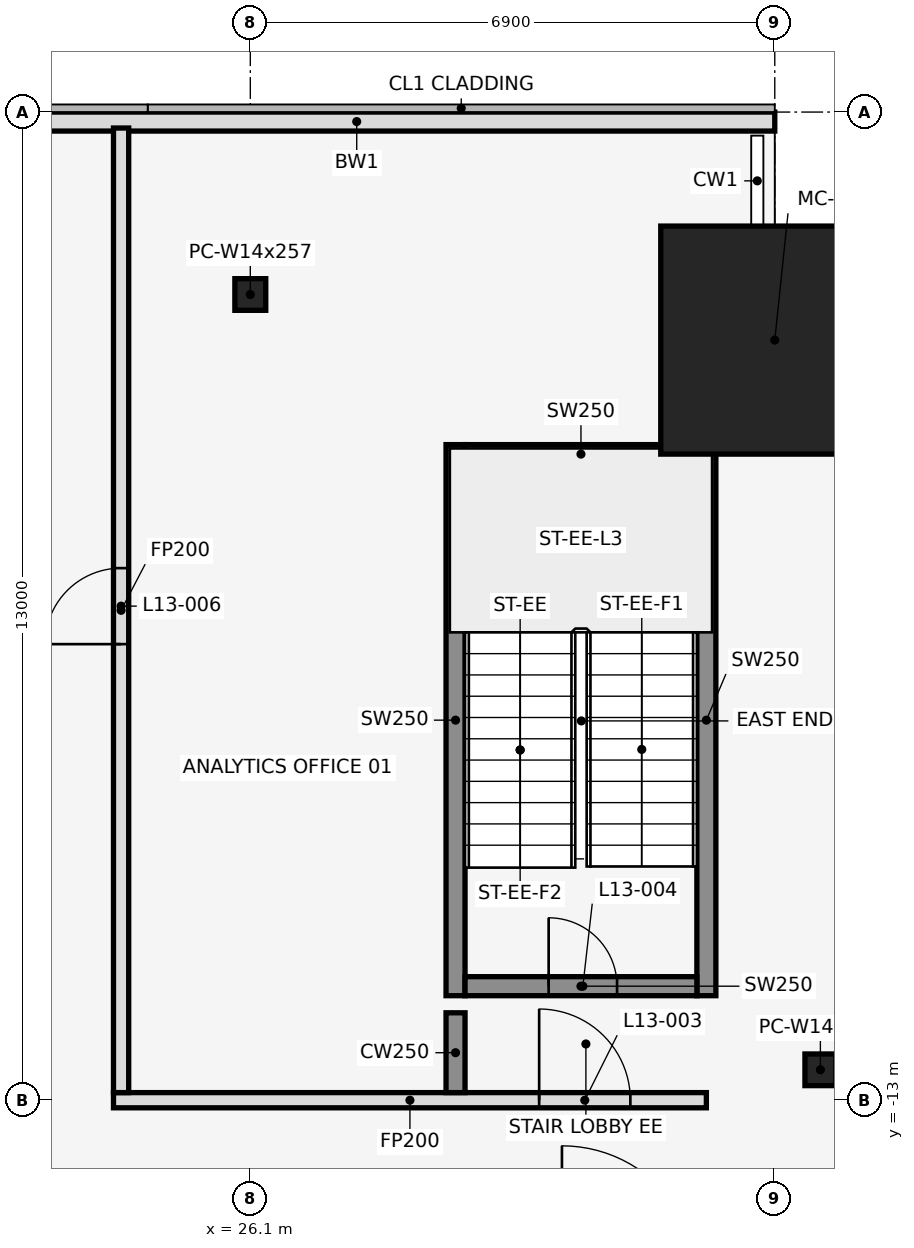
"""IFC4 building model, lengths in metres.
Left out: names, types, materials, properties, quantities, classifications, styles, units other than length and angle.
Written with IfcOpenShell. Run it as: python <this file> out.ifc"""

import sys

from ifc_helpers import new_model, si_unit, direction, frame, frame_2d, origin, origin_2d, place, context, subcontext, project, spatial, rectangle, hollow_rectangle, i_section, extrude, element, fill, save


model = new_model("IFC4")
c1 = context("Model", 3, precision=1e-05, world=origin(), true_north=direction((0.0, 1.0)))
c2 = subcontext(c1, "Body", "Model", "MODEL_VIEW")
j1 = project(units=[si_unit("LENGTHUNIT", "METRE"), si_unit("PLANEANGLEUNIT", "RADIAN")], contexts=[c1])
p1 = place(None, origin())
s1 = spatial("IfcSite", under=j1, at=p1, CompositionType="ELEMENT")
p2 = place(p1, origin())
s2 = spatial("IfcBuilding", under=s1, at=p2, CompositionType="ELEMENT")
p3 = place(p2, frame((0.0, 0.0, 66.5)))
s3 = spatial("IfcBuildingStorey", under=s2, at=p3, CompositionType="ELEMENT", Elevation=66.5)
p4 = place(p3, frame((26.1, -2.4, 0.0), z_axis=(0.0, 0.0, 1.0), x_axis=(1.0, 0.0, 0.0)))
e1 = element("IfcColumn", 1, at=p4, inside=s3, PredefinedType="COLUMN", context=c2, shape_type="SweptSolid", body=[
    extrude(i_section(OverallWidth=0.406, OverallDepth=0.417, WebThickness=0.03, FlangeThickness=0.048, at=origin_2d()), origin(), (0.0, 0.0, 1.0), 4.5),
])
p5 = place(p3, frame((33.0, -3.0, 0.0), z_axis=(0.0, 0.0, 1.0), x_axis=(1.0, 0.0, 0.0)))
e2 = element("IfcColumn", 2, at=p5, inside=s3, PredefinedType="COLUMN", context=c2, shape_type="SweptSolid", body=[
    extrude(hollow_rectangle(XDim=3.0, YDim=3.0, WallThickness=0.1, at=origin_2d()), origin(), (0.0, 0.0, 1.0), 4.5),
])
p6 = place(p3, frame((33.6, -12.6, 0.0), z_axis=(0.0, 0.0, 1.0), x_axis=(1.0, 0.0, 0.0)))
e3 = element("IfcColumn", 3, at=p6, inside=s3, PredefinedType="COLUMN", context=c2, shape_type="SweptSolid", body=[
    extrude(i_section(OverallWidth=0.406, OverallDepth=0.417, WebThickness=0.03, FlangeThickness=0.048, at=origin_2d()), origin(), (0.0, 0.0, 1.0), 4.5),
])
p7 = place(p3, frame((33.0, -0.125, 0.0), z_axis=(0.0, 0.0, 1.0), x_axis=(-1.0, 0.0, 0.0)))
e4 = element("IfcWall", 4, at=p7, inside=s3, PredefinedType="STANDARD", context=c2, shape_type="SweptSolid", body=[
    extrude(rectangle(XDim=11.0, YDim=0.25, at=frame_2d((5.5, 0.0))), origin(), (0.0, 0.0, 1.0), 4.35),
])
for number, where, z_axis, x_axis in (
    (5, (28.8, -11.625, 0.0), (0.0, 0.0, 1.0), (0.0, 1.0, 0.0)),
    (6, (32.1, -11.625, 0.0), (0.0, 0.0, 1.0), (0.0, 1.0, 0.0)),
):
    element("IfcWall", number, at=place(p3, frame(where, z_axis=z_axis, x_axis=x_axis)), inside=s3, PredefinedType="SHEAR", context=c2, shape_type="SweptSolid", body=[
        extrude(rectangle(XDim=7.25, YDim=0.25, at=frame_2d((3.625, 0.0))), origin(), (0.0, 0.0, 1.0), 4.5),
    ])
p8 = place(p3, frame((28.925, -11.5, 0.0), z_axis=(0.0, 0.0, 1.0), x_axis=(1.0, 0.0, 0.0)))
e7 = element("IfcWall", 7, at=p8, inside=s3, PredefinedType="SHEAR", context=c2, shape_type="SweptSolid", body=[
    extrude(rectangle(XDim=3.05, YDim=0.25, at=frame_2d((1.525, 0.0))), origin(), (0.0, 0.0, 1.0), 4.5),
])
p9 = place(p8, frame((1.1, 0.0, 0.0)))
e8 = element("IfcOpeningElement", 8, at=p9, cuts=e7, PredefinedType="OPENING", context=c2, shape_type="SweptSolid", body=[
    extrude(rectangle(XDim=0.9, YDim=2.1, at=frame_2d((0.45, 1.05))), frame((0.0, 0.137, 0.0), z_axis=(0.0, -1.0, 0.0), x_axis=(1.0, 0.0, 0.0)), (0.0, 0.0, 1.0), 0.274),
])
p10 = place(p3, frame((28.925, -4.5, 0.0), z_axis=(0.0, 0.0, 1.0), x_axis=(1.0, 0.0, 0.0)))
e9 = element("IfcWall", 9, at=p10, inside=s3, PredefinedType="SHEAR", context=c2, shape_type="SweptSolid", body=[
    extrude(rectangle(XDim=3.05, YDim=0.25, at=frame_2d((1.525, 0.0))), origin(), (0.0, 0.0, 1.0), 4.5),
])
p11 = place(p3, frame((24.3, -13.0, 0.0), z_axis=(0.0, 0.0, 1.0), x_axis=(1.0, 0.0, 0.0)))
e10 = element("IfcWall", 10, at=p11, inside=s3, PredefinedType="PARTITIONING", context=c2, shape_type="SweptSolid", body=[
    extrude(rectangle(XDim=7.8, YDim=0.2, at=frame_2d((3.9, 0.0))), origin(), (0.0, 0.0, 1.0), 3.418),
])
p12 = place(p11, frame((5.6, 0.0, 0.0)))
e11 = element("IfcOpeningElement", 11, at=p12, cuts=e10, PredefinedType="OPENING", context=c2, shape_type="SweptSolid", body=[
    extrude(rectangle(XDim=1.2, YDim=2.1, at=frame_2d((0.6, 1.05))), frame((0.0, 0.112, 0.0), z_axis=(0.0, -1.0, 0.0), x_axis=(1.0, 0.0, 0.0)), (0.0, 0.0, 1.0), 0.224),
])
p13 = place(p3, frame((24.4, -12.9, 0.0), z_axis=(0.0, 0.0, 1.0), x_axis=(0.0, 1.0, 0.0)))
e12 = element("IfcWall", 12, at=p13, inside=s3, PredefinedType="PARTITIONING", context=c2, shape_type="SweptSolid", body=[
    extrude(rectangle(XDim=12.69, YDim=0.2, at=frame_2d((6.345, 0.0))), origin(), (0.0, 0.0, 1.0), 3.418),
])
p14 = place(p13, frame((5.9, 0.0, 0.0)))
e13 = element("IfcOpeningElement", 13, at=p14, cuts=e12, PredefinedType="OPENING", context=c2, shape_type="SweptSolid", body=[
    extrude(rectangle(XDim=1.0, YDim=2.1, at=frame_2d((0.5, 1.05))), frame((0.0, 0.112, 0.0), z_axis=(0.0, -1.0, 0.0), x_axis=(1.0, 0.0, 0.0)), (0.0, 0.0, 1.0), 0.224),
])
p15 = place(p3, frame((28.8, -12.9, 0.0), z_axis=(0.0, 0.0, 1.0), x_axis=(0.0, 1.0, 0.0)))
e14 = element("IfcWall", 14, at=p15, inside=s3, PredefinedType="SHEAR", context=c2, shape_type="SweptSolid", body=[
    extrude(rectangle(XDim=1.05, YDim=0.25, at=frame_2d((0.525, 0.0))), origin(), (0.0, 0.0, 1.0), 4.5),
])
p16 = place(p12, origin())
e15 = element("IfcDoor", 15, at=p16, inside=s3, OperationType="SINGLE_SWING_RIGHT", PredefinedType="DOOR", context=c2, shape_type="SweptSolid", body=[
    extrude(rectangle(XDim=1.2, YDim=2.1, at=frame_2d((0.6, 1.05))), frame((0.0, 0.025, 0.0), z_axis=(0.0, -1.0, 0.0), x_axis=(1.0, 0.0, 0.0)), (0.0, 0.0, 1.0), 0.05),
])
fill(e11, e15)
p17 = place(p9, origin())
e16 = element("IfcDoor", 16, at=p17, inside=s3, OperationType="SINGLE_SWING_LEFT", PredefinedType="DOOR", context=c2, shape_type="SweptSolid", body=[
    extrude(rectangle(XDim=0.9, YDim=2.1, at=frame_2d((0.45, 1.05))), frame((0.0, 0.025, 0.0), z_axis=(0.0, -1.0, 0.0), x_axis=(1.0, 0.0, 0.0)), (0.0, 0.0, 1.0), 0.05),
])
fill(e8, e16)
p18 = place(p14, frame((1.0, 0.0, 0.0), z_axis=(0.0, 0.0, 1.0), x_axis=(-1.0, 0.0, 0.0)))
e17 = element("IfcDoor", 17, at=p18, inside=s3, OperationType="SINGLE_SWING_RIGHT", PredefinedType="DOOR", context=c2, shape_type="SweptSolid", body=[
    extrude(rectangle(XDim=1.0, YDim=2.1, at=frame_2d((0.5, 1.05))), frame((0.0, 0.025, 0.0), z_axis=(0.0, -1.0, 0.0), x_axis=(1.0, 0.0, 0.0)), (0.0, 0.0, 1.0), 0.05),
])
fill(e13, e17)
save(model, sys.argv[1])
